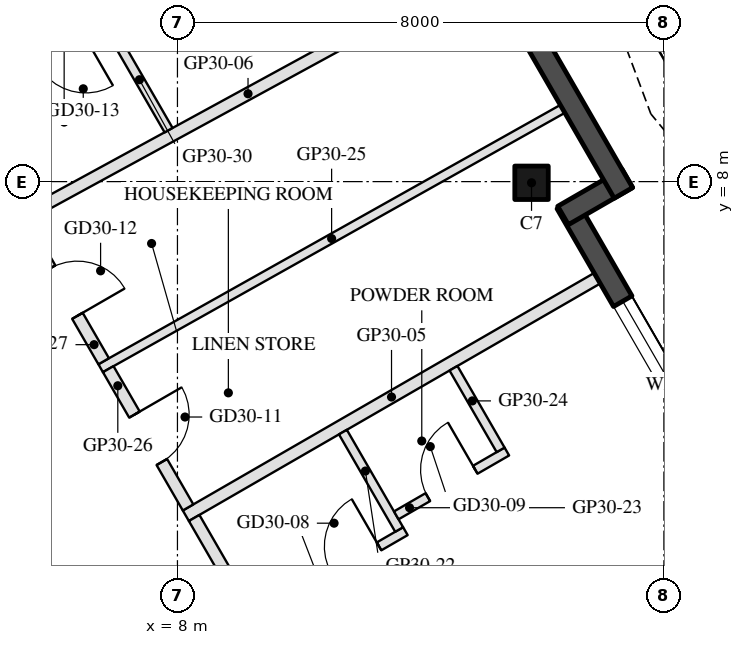
"""IFC4 building model, lengths in metres.
Left out: names, types, materials, properties, quantities, classifications, styles, units other than length and angle.
Written with IfcOpenShell. Run it as: python <this file> out.ifc"""

import sys

from ifc_helpers import new_model, si_unit, direction, frame, frame_2d, origin, origin_2d, place, context, subcontext, project, spatial, rectangle, hollow_rectangle, extrude, boolean, halfspace, element, fill, save


model = new_model("IFC4")
c1 = context("Model", 3, precision=1e-05, world=origin(), true_north=direction((0.0, 1.0)))
c2 = subcontext(c1, "Body", "Model", "MODEL_VIEW")
j1 = project(units=[si_unit("LENGTHUNIT", "METRE"), si_unit("PLANEANGLEUNIT", "RADIAN")], contexts=[c1])
p1 = place(None, origin())
s1 = spatial("IfcSite", under=j1, at=p1, CompositionType="ELEMENT")
p2 = place(p1, origin())
s2 = spatial("IfcBuilding", under=s1, at=p2, CompositionType="ELEMENT")
p3 = place(p2, frame((0.0, 0.0, 298.5)))
s3 = spatial("IfcBuildingStorey", under=s2, at=p3, CompositionType="ELEMENT", Elevation=298.5)
p4 = place(p3, frame((13.823, 7.981, 0.0), z_axis=(-0.131228839908, -0.075723997581, 0.988455799602), x_axis=(0.499841813697, -0.866116713392, 7.933019e-06)))
e1 = element("IfcColumn", 1, at=p4, inside=s3, PredefinedType="COLUMN", context=c2, shape_type="SweptSolid", body=[
    boolean("DIFFERENCE", boolean("DIFFERENCE", extrude(hollow_rectangle(XDim=0.55, YDim=0.55, WallThickness=0.025, at=origin_2d()), origin(), (0.0, 0.0, 1.0), 3.743), halfspace(frame((0.0, 0.0, 0.031), z_axis=(0.0, 0.0, 1.0), x_axis=(1.0, 0.0, 0.0)), True)), halfspace(frame((0.0, 0.0, 3.712), z_axis=(0.0, 0.0, 1.0), x_axis=(1.0, 0.0, 0.0)), False)),
])
p5 = place(p3, frame((17.308, 2.595, 0.0), z_axis=(0.0, 0.0, 1.0), x_axis=(-0.500005339912, 0.866022320763, 0.0)))
e2 = element("IfcWall", 2, at=p5, inside=s3, PredefinedType="SOLIDWALL", context=c2, shape_type="SweptSolid", body=[
    extrude(rectangle(XDim=5.827, YDim=0.35, at=frame_2d((2.914, 0.0))), origin(), (0.0, 0.0, 1.0), 3.55),
])
p6 = place(p5, frame((0.77, 0.0, 0.3)))
e3 = element("IfcOpeningElement", 3, at=p6, cuts=e2, PredefinedType="OPENING", context=c2, shape_type="SweptSolid", body=[
    extrude(rectangle(XDim=3.2, YDim=2.65, at=frame_2d((1.6, 1.325))), frame((0.0, 0.185, 0.0), z_axis=(0.0, -1.0, 0.0), x_axis=(1.0, 0.0, 0.0)), (0.0, 0.0, 1.0), 0.37),
])
p7 = place(p3, frame((14.342, 7.443, 0.0), z_axis=(0.0, 0.0, 1.0), x_axis=(0.866092288191, 0.499884134912, 0.0)))
e4 = element("IfcWall", 4, at=p7, inside=s3, PredefinedType="SOLIDWALL", context=c2, shape_type="SweptSolid", body=[
    extrude(rectangle(XDim=1.22, YDim=0.35, at=frame_2d((0.61, 0.0))), origin(), (0.0, 0.0, 1.0), 3.55),
])
p8 = place(p3, frame((15.334, 7.814, 0.0), z_axis=(0.0, 0.0, 1.0), x_axis=(-0.499999835575, 0.866025498715, 0.0)))
e5 = element("IfcWall", 5, at=p8, inside=s3, PredefinedType="SOLIDWALL", context=c2, shape_type="SweptSolid", body=[
    extrude(rectangle(XDim=8.787, YDim=0.35, at=frame_2d((4.394, 0.0))), origin(), (0.0, 0.0, 1.0), 3.55),
])
p9 = place(p8, frame((4.844, 0.0, 0.3)))
e6 = element("IfcOpeningElement", 6, at=p9, cuts=e5, PredefinedType="OPENING", context=c2, shape_type="SweptSolid", body=[
    extrude(rectangle(XDim=2.1, YDim=2.65, at=frame_2d((1.05, 1.325))), frame((0.0, 0.185, 0.0), z_axis=(0.0, -1.0, 0.0), x_axis=(1.0, 0.0, 0.0)), (0.0, 0.0, 1.0), 0.37),
])
p10 = place(p3, frame((14.903, 6.41, 0.0), z_axis=(0.0, 0.0, 1.0), x_axis=(-0.866030491634, -0.499991187483, 0.0)))
e7 = element("IfcWall", 7, at=p10, inside=s3, PredefinedType="PARTITIONING", context=c2, shape_type="SweptSolid", body=[
    extrude(rectangle(XDim=7.812, YDim=0.2, at=frame_2d((3.906, 0.0))), origin(), (0.0, 0.0, 1.0), 3.1),
])
p11 = place(p3, frame((12.986, 11.531, 0.0), z_axis=(0.0, 0.0, 1.0), x_axis=(-0.877887007044, -0.478867834442, 0.0)))
e8 = element("IfcWall", 8, at=p11, inside=s3, PredefinedType="PARTITIONING", context=c2, shape_type="SweptSolid", body=[
    extrude(rectangle(XDim=8.714, YDim=0.2, at=frame_2d((4.357, 0.0))), origin(), (0.0, 0.0, 1.0), 3.1),
])
p12 = place(p3, frame((8.275, 2.468, 0.0), z_axis=(0.0, 0.0, 1.0), x_axis=(0.500004647933, -0.866022720283, 0.0)))
e9 = element("IfcWall", 9, at=p12, inside=s3, PredefinedType="PARTITIONING", context=c2, shape_type="SweptSolid", body=[
    extrude(rectangle(XDim=7.988, YDim=0.2, at=frame_2d((3.994, 0.0))), origin(), (0.0, 0.0, 1.0), 3.1),
])
p13 = place(p12, frame((2.45, 0.0, 0.0)))
e10 = element("IfcOpeningElement", 10, at=p13, cuts=e9, PredefinedType="OPENING", context=c2, shape_type="SweptSolid", body=[
    extrude(rectangle(XDim=1.0, YDim=2.1, at=frame_2d((0.5, 1.05))), frame((0.0, 0.11, 0.0), z_axis=(0.0, -1.0, 0.0), x_axis=(1.0, 0.0, 0.0)), (0.0, 0.0, 1.0), 0.22),
])
p14 = place(p3, frame((9.324, 0.851, 0.0), z_axis=(0.0, 0.0, 1.0), x_axis=(0.865996816683, 0.500049511043, 0.0)))
e11 = element("IfcWall", 11, at=p14, inside=s3, PredefinedType="PARTITIONING", context=c2, shape_type="SweptSolid", body=[
    extrude(rectangle(XDim=2.8, YDim=0.15, at=frame_2d((1.4, 0.0))), origin(), (0.0, 0.0, 1.0), 3.55),
])
p15 = place(p14, frame((1.4, 0.0, 0.0)))
e12 = element("IfcOpeningElement", 12, at=p15, cuts=e11, PredefinedType="OPENING", context=c2, shape_type="SweptSolid", body=[
    extrude(rectangle(XDim=0.9, YDim=2.1, at=frame_2d((0.45, 1.05))), frame((0.0, 0.085, 0.0), z_axis=(0.0, -1.0, 0.0), x_axis=(1.0, 0.0, 0.0)), (0.0, 0.0, 1.0), 0.17),
])
p16 = place(p3, frame((11.646, 2.278, 0.0), z_axis=(0.0, 0.0, 1.0), x_axis=(-0.49994333299, 0.866058118026, 0.0)))
e13 = element("IfcWall", 13, at=p16, inside=s3, PredefinedType="PARTITIONING", context=c2, shape_type="SweptSolid", body=[
    extrude(rectangle(XDim=1.85, YDim=0.15, at=frame_2d((0.925, 0.0))), origin(), (0.0, 0.0, 1.0), 3.1),
])
p17 = place(p3, frame((11.599, 2.511, 0.0), z_axis=(0.0, 0.0, 1.0), x_axis=(0.866009402589, 0.500027713859, 0.0)))
e14 = element("IfcWall", 14, at=p17, inside=s3, PredefinedType="PARTITIONING", context=c2, shape_type="SweptSolid", body=[
    extrude(rectangle(XDim=2.1, YDim=0.15, at=frame_2d((1.05, 0.0))), origin(), (0.0, 0.0, 1.0), 3.55),
])
p18 = place(p17, frame((0.6, 0.0, 0.0)))
e15 = element("IfcOpeningElement", 15, at=p18, cuts=e14, PredefinedType="OPENING", context=c2, shape_type="SweptSolid", body=[
    extrude(rectangle(XDim=0.9, YDim=2.1, at=frame_2d((0.45, 1.05))), frame((0.0, 0.085, 0.0), z_axis=(0.0, -1.0, 0.0), x_axis=(1.0, 0.0, 0.0)), (0.0, 0.0, 1.0), 0.17),
])
p19 = place(p3, frame((13.315, 3.588, 0.0), z_axis=(0.0, 0.0, 1.0), x_axis=(-0.499967891604, 0.866043940782, 0.0)))
e16 = element("IfcWall", 16, at=p19, inside=s3, PredefinedType="PARTITIONING", context=c2, shape_type="SweptSolid", body=[
    extrude(rectangle(XDim=1.55, YDim=0.15, at=frame_2d((0.775, 0.0))), origin(), (0.0, 0.0, 1.0), 3.1),
])
p20 = place(p3, frame((14.334, 9.196, 0.0), z_axis=(0.0, 0.0, 1.0), x_axis=(-0.872016731473, -0.489476066863, 0.0)))
e17 = element("IfcWall", 17, at=p20, inside=s3, PredefinedType="PARTITIONING", context=c2, shape_type="SweptSolid", body=[
    extrude(rectangle(XDim=8.712, YDim=0.15, at=frame_2d((4.356, 0.0))), origin(), (0.0, 0.0, 1.0), 3.1),
])
p21 = place(p3, frame((6.862, 4.916, 0.0), z_axis=(0.0, 0.0, 1.0), x_axis=(0.499958506883, -0.866049358521, 0.0)))
e18 = element("IfcWall", 18, at=p21, inside=s3, PredefinedType="PARTITIONING", context=c2, shape_type="SweptSolid", body=[
    extrude(rectangle(XDim=2.626, YDim=0.2, at=frame_2d((1.313, 0.0))), origin(), (0.0, 0.0, 1.0), 3.1),
])
p22 = place(p21, frame((0.863, 0.0, 0.0)))
e19 = element("IfcOpeningElement", 19, at=p22, cuts=e18, PredefinedType="OPENING", context=c2, shape_type="SweptSolid", body=[
    extrude(rectangle(XDim=0.9, YDim=2.1, at=frame_2d((0.45, 1.05))), frame((0.0, 0.11, 0.0), z_axis=(0.0, -1.0, 0.0), x_axis=(1.0, 0.0, 0.0)), (0.0, 0.0, 1.0), 0.22),
])
p23 = place(p3, frame((5.473, 7.32, 0.0), z_axis=(0.0, 0.0, 1.0), x_axis=(0.500028228617, -0.866009105372, 0.0)))
e20 = element("IfcWall", 20, at=p23, inside=s3, PredefinedType="PARTITIONING", context=c2, shape_type="SweptSolid", body=[
    extrude(rectangle(XDim=2.626, YDim=0.2, at=frame_2d((1.313, 0.0))), origin(), (0.0, 0.0, 1.0), 3.1),
])
p24 = place(p23, frame((0.863, 0.0, 0.0)))
e21 = element("IfcOpeningElement", 21, at=p24, cuts=e20, PredefinedType="OPENING", context=c2, shape_type="SweptSolid", body=[
    extrude(rectangle(XDim=0.9, YDim=2.1, at=frame_2d((0.45, 1.05))), frame((0.0, 0.11, 0.0), z_axis=(0.0, -1.0, 0.0), x_axis=(1.0, 0.0, 0.0)), (0.0, 0.0, 1.0), 0.22),
])
p25 = place(p3, frame((6.924, 10.608, 0.0), z_axis=(0.0, 0.0, 1.0), x_axis=(-0.866034573852, -0.49998411664, 0.0)))
e22 = element("IfcWall", 22, at=p25, inside=s3, PredefinedType="PARTITIONING", context=c2, shape_type="SweptSolid", body=[
    extrude(rectangle(XDim=2.8, YDim=0.15, at=frame_2d((1.4, 0.0))), origin(), (0.0, 0.0, 1.0), 3.55),
])
p26 = place(p25, frame((0.5, 0.0, 0.0)))
e23 = element("IfcOpeningElement", 23, at=p26, cuts=e22, PredefinedType="OPENING", context=c2, shape_type="SweptSolid", body=[
    extrude(rectangle(XDim=0.9, YDim=2.1, at=frame_2d((0.45, 1.05))), frame((0.0, 0.085, 0.0), z_axis=(0.0, -1.0, 0.0), x_axis=(1.0, 0.0, 0.0)), (0.0, 0.0, 1.0), 0.17),
])
p27 = place(p3, frame((7.854, 8.846, 0.0), z_axis=(0.0, 0.0, 1.0), x_axis=(-0.500071685664, 0.865984012091, 0.0)))
e24 = element("IfcWall", 24, at=p27, inside=s3, PredefinedType="PARTITIONING", context=c2, shape_type="SweptSolid", body=[
    extrude(rectangle(XDim=1.916, YDim=0.15, at=frame_2d((0.958, 0.0))), origin(), (0.0, 0.0, 1.0), 3.55),
])
p28 = place(p6, origin())
e25 = element("IfcWindow", 25, at=p28, inside=s3, PartitioningType="SINGLE_PANEL", PredefinedType="WINDOW", context=c2, shape_type="SweptSolid", body=[
    extrude(rectangle(XDim=3.2, YDim=2.65, at=frame_2d((1.6, 1.325))), frame((0.0, 0.03, 0.0), z_axis=(0.0, -1.0, 0.0), x_axis=(1.0, 0.0, 0.0)), (0.0, 0.0, 1.0), 0.06),
])
fill(e3, e25)
p29 = place(p15, origin())
e26 = element("IfcDoor", 26, at=p29, inside=s3, OperationType="SINGLE_SWING_RIGHT", PredefinedType="DOOR", context=c2, shape_type="SweptSolid", body=[
    extrude(rectangle(XDim=0.9, YDim=2.1, at=frame_2d((0.45, 1.05))), frame((0.0, 0.025, 0.0), z_axis=(0.0, -1.0, 0.0), x_axis=(1.0, 0.0, 0.0)), (0.0, 0.0, 1.0), 0.05),
])
fill(e12, e26)
p30 = place(p18, origin())
e27 = element("IfcDoor", 27, at=p30, inside=s3, OperationType="SINGLE_SWING_RIGHT", PredefinedType="DOOR", context=c2, shape_type="SweptSolid", body=[
    extrude(rectangle(XDim=0.9, YDim=2.1, at=frame_2d((0.45, 1.05))), frame((0.0, 0.025, 0.0), z_axis=(0.0, -1.0, 0.0), x_axis=(1.0, 0.0, 0.0)), (0.0, 0.0, 1.0), 0.05),
])
fill(e15, e27)
p31 = place(p22, origin())
e28 = element("IfcDoor", 28, at=p31, inside=s3, OperationType="SINGLE_SWING_LEFT", PredefinedType="DOOR", context=c2, shape_type="SweptSolid", body=[
    extrude(rectangle(XDim=0.9, YDim=2.1, at=frame_2d((0.45, 1.05))), frame((0.0, 0.025, 0.0), z_axis=(0.0, -1.0, 0.0), x_axis=(1.0, 0.0, 0.0)), (0.0, 0.0, 1.0), 0.05),
])
fill(e19, e28)
p32 = place(p24, origin())
e29 = element("IfcDoor", 29, at=p32, inside=s3, OperationType="SINGLE_SWING_RIGHT", PredefinedType="DOOR", context=c2, shape_type="SweptSolid", body=[
    extrude(rectangle(XDim=0.9, YDim=2.1, at=frame_2d((0.45, 1.05))), frame((0.0, 0.025, 0.0), z_axis=(0.0, -1.0, 0.0), x_axis=(1.0, 0.0, 0.0)), (0.0, 0.0, 1.0), 0.05),
])
fill(e21, e29)
p33 = place(p26, origin())
e30 = element("IfcDoor", 30, at=p33, inside=s3, OperationType="SINGLE_SWING_LEFT", PredefinedType="DOOR", context=c2, shape_type="SweptSolid", body=[
    extrude(rectangle(XDim=0.9, YDim=2.1, at=frame_2d((0.45, 1.05))), frame((0.0, 0.025, 0.0), z_axis=(0.0, -1.0, 0.0), x_axis=(1.0, 0.0, 0.0)), (0.0, 0.0, 1.0), 0.05),
])
fill(e23, e30)
save(model, sys.argv[1])
